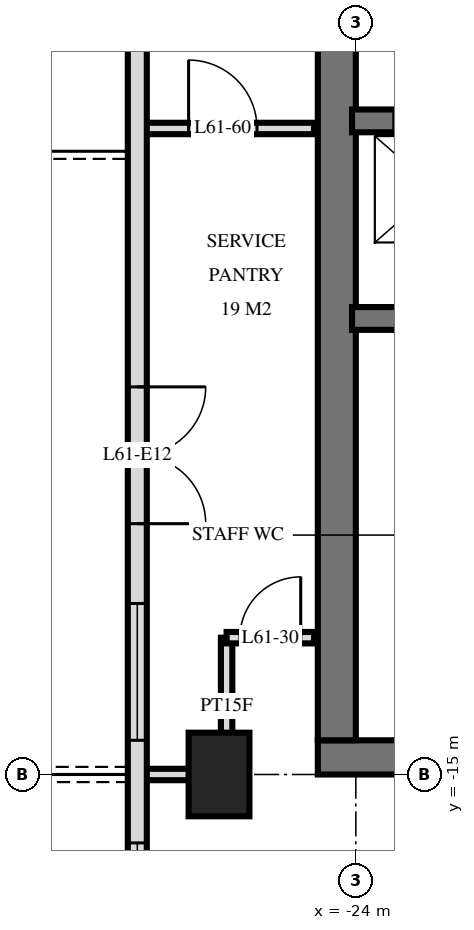
"""IFC4 building model, lengths in metres.
Left out: names, types, materials, properties, quantities, classifications, styles, units other than length and angle.
Written with IfcOpenShell. Run it as: python <this file> out.ifc"""

import sys

from ifc_helpers import new_model, si_unit, direction, frame, frame_2d, origin, origin_2d, place, context, subcontext, project, spatial, rectangle, extrude, element, fill, save


model = new_model("IFC4")
c1 = context("Model", 3, precision=1e-05, world=origin(), true_north=direction((0.0, 1.0)))
c2 = subcontext(c1, "Body", "Model", "MODEL_VIEW")
j1 = project(units=[si_unit("LENGTHUNIT", "METRE"), si_unit("PLANEANGLEUNIT", "RADIAN")], contexts=[c1])
p1 = place(None, origin())
s1 = spatial("IfcSite", under=j1, at=p1, CompositionType="ELEMENT")
p2 = place(p1, origin())
s2 = spatial("IfcBuilding", under=s1, at=p2, CompositionType="ELEMENT")
p3 = place(p2, frame((0.0, 0.0, 232.6)))
s3 = spatial("IfcBuildingStorey", under=s2, at=p3, CompositionType="ELEMENT", Elevation=232.6)
p4 = place(p3, frame((-25.8, -15.0, 0.0), z_axis=(0.0, 0.0, 1.0), x_axis=(0.0, 1.0, 0.0)))
e1 = element("IfcColumn", 1, at=p4, inside=s3, PredefinedType="COLUMN", context=c2, shape_type="SweptSolid", body=[
    extrude(rectangle(XDim=1.1, YDim=0.8, at=origin_2d()), origin(), (0.0, 0.0, 1.0), 3.5),
])
p5 = place(p3, frame((-24.5, -14.775, 0.0), z_axis=(0.0, 0.0, 1.0), x_axis=(1.0, 0.0, 0.0)))
e2 = element("IfcWall", 2, at=p5, inside=s3, PredefinedType="SHEAR", context=c2, shape_type="SweptSolid", body=[
    extrude(rectangle(XDim=14.5, YDim=0.45, at=frame_2d((7.25, 0.0))), origin(), (0.0, 0.0, 1.0), 3.5),
])
p6 = place(p5, frame((6.2, 0.0, 0.0)))
e3 = element("IfcOpeningElement", 3, at=p6, cuts=e2, PredefinedType="OPENING", context=c2, shape_type="SweptSolid", body=[
    extrude(rectangle(XDim=1.2, YDim=2.1, at=frame_2d((0.6, 1.05))), frame((0.0, 0.235, 0.0), z_axis=(0.0, -1.0, 0.0), x_axis=(1.0, 0.0, 0.0)), (0.0, 0.0, 1.0), 0.47),
])
p7 = place(p5, frame((9.25, 0.0, 0.0)))
e4 = element("IfcOpeningElement", 4, at=p7, cuts=e2, PredefinedType="OPENING", context=c2, shape_type="SweptSolid", body=[
    extrude(rectangle(XDim=1.1, YDim=2.1, at=frame_2d((0.55, 1.05))), frame((0.0, 0.235, 0.0), z_axis=(0.0, -1.0, 0.0), x_axis=(1.0, 0.0, 0.0)), (0.0, 0.0, 1.0), 0.47),
])
p8 = place(p5, frame((3.5, 0.0, 0.0)))
e5 = element("IfcOpeningElement", 5, at=p8, cuts=e2, PredefinedType="OPENING", context=c2, shape_type="SweptSolid", body=[
    extrude(rectangle(XDim=0.9, YDim=2.1, at=frame_2d((0.45, 1.05))), frame((0.0, 0.235, 0.0), z_axis=(0.0, -1.0, 0.0), x_axis=(1.0, 0.0, 0.0)), (0.0, 0.0, 1.0), 0.47),
])
p9 = place(p5, frame((1.05, 0.0, 0.0)))
e6 = element("IfcOpeningElement", 6, at=p9, cuts=e2, PredefinedType="OPENING", context=c2, shape_type="SweptSolid", body=[
    extrude(rectangle(XDim=1.0, YDim=2.1, at=frame_2d((0.5, 1.05))), frame((0.0, 0.235, 0.0), z_axis=(0.0, -1.0, 0.0), x_axis=(1.0, 0.0, 0.0)), (0.0, 0.0, 1.0), 0.47),
])
p10 = place(p3, frame((-24.25, -14.55, 0.0), z_axis=(0.0, 0.0, 1.0), x_axis=(0.0, 1.0, 0.0)))
e7 = element("IfcWall", 7, at=p10, inside=s3, PredefinedType="SHEAR", context=c2, shape_type="SweptSolid", body=[
    extrude(rectangle(XDim=14.1, YDim=0.5, at=frame_2d((7.05, 0.0))), origin(), (0.0, 0.0, 1.0), 3.5),
])
p11 = place(p3, frame((-24.05, -6.4, 0.0), z_axis=(0.0, 0.0, 1.0), x_axis=(1.0, 0.0, 0.0)))
e8 = element("IfcWall", 8, at=p11, inside=s3, PredefinedType="SHEAR", context=c2, shape_type="SweptSolid", body=[
    extrude(rectangle(XDim=13.7, YDim=0.3, at=frame_2d((6.85, 0.0))), origin(), (0.0, 0.0, 1.0), 3.5),
])
p12 = place(p11, frame((0.55, 0.0, 0.0)))
e9 = element("IfcOpeningElement", 9, at=p12, cuts=e8, PredefinedType="OPENING", context=c2, shape_type="SweptSolid", body=[
    extrude(rectangle(XDim=1.1, YDim=2.1, at=frame_2d((0.55, 1.05))), frame((0.0, 0.16, 0.0), z_axis=(0.0, -1.0, 0.0), x_axis=(1.0, 0.0, 0.0)), (0.0, 0.0, 1.0), 0.32),
])
p13 = place(p11, frame((5.8, 0.0, 0.0)))
e10 = element("IfcOpeningElement", 10, at=p13, cuts=e8, PredefinedType="OPENING", context=c2, shape_type="SweptSolid", body=[
    extrude(rectangle(XDim=1.1, YDim=2.1, at=frame_2d((0.55, 1.05))), frame((0.0, 0.16, 0.0), z_axis=(0.0, -1.0, 0.0), x_axis=(1.0, 0.0, 0.0)), (0.0, 0.0, 1.0), 0.32),
])
p14 = place(p3, frame((-24.05, -9.0, 0.0), z_axis=(0.0, 0.0, 1.0), x_axis=(1.0, 0.0, 0.0)))
e11 = element("IfcWall", 11, at=p14, inside=s3, PredefinedType="SHEAR", context=c2, shape_type="SweptSolid", body=[
    extrude(rectangle(XDim=13.7, YDim=0.3, at=frame_2d((6.85, 0.0))), origin(), (0.0, 0.0, 1.0), 3.5),
])
p15 = place(p14, frame((8.8, 0.0, 0.0)))
e12 = element("IfcOpeningElement", 12, at=p15, cuts=e11, PredefinedType="OPENING", context=c2, shape_type="SweptSolid", body=[
    extrude(rectangle(XDim=1.1, YDim=2.1, at=frame_2d((0.55, 1.05))), frame((0.0, 0.16, 0.0), z_axis=(0.0, -1.0, 0.0), x_axis=(1.0, 0.0, 0.0)), (0.0, 0.0, 1.0), 0.32),
])
p16 = place(p3, frame((-26.875, -3.325, 0.0), z_axis=(0.0, 0.0, 1.0), x_axis=(0.0, -1.0, 0.0)))
e13 = element("IfcWall", 13, at=p16, inside=s3, PredefinedType="SOLIDWALL", context=c2, shape_type="SweptSolid", body=[
    extrude(rectangle(XDim=21.551, YDim=0.25, at=frame_2d((10.775, 0.0))), origin(), (0.0, 0.0, 1.0), 3.22),
])
p17 = place(p16, frame((6.575, 0.0, 0.0)))
e14 = element("IfcOpeningElement", 14, at=p17, cuts=e13, PredefinedType="OPENING", context=c2, shape_type="SweptSolid", body=[
    extrude(rectangle(XDim=1.8, YDim=2.4, at=frame_2d((0.9, 1.2))), frame((0.0, 0.135, 0.0), z_axis=(0.0, -1.0, 0.0), x_axis=(1.0, 0.0, 0.0)), (0.0, 0.0, 1.0), 0.27),
])
p18 = place(p16, frame((9.425, 0.0, 0.9)))
e15 = element("IfcOpeningElement", 15, at=p18, cuts=e13, PredefinedType="OPENING", context=c2, shape_type="SweptSolid", body=[
    extrude(rectangle(XDim=1.8, YDim=1.5, at=frame_2d((0.9, 0.75))), frame((0.0, 0.135, 0.0), z_axis=(0.0, -1.0, 0.0), x_axis=(1.0, 0.0, 0.0)), (0.0, 0.0, 1.0), 0.27),
])
p19 = place(p16, frame((12.575, 0.0, 0.9)))
e16 = element("IfcOpeningElement", 16, at=p19, cuts=e13, PredefinedType="OPENING", context=c2, shape_type="SweptSolid", body=[
    extrude(rectangle(XDim=1.2, YDim=1.5, at=frame_2d((0.6, 0.75))), frame((0.0, 0.135, 0.0), z_axis=(0.0, -1.0, 0.0), x_axis=(1.0, 0.0, 0.0)), (0.0, 0.0, 1.0), 0.27),
])
p20 = place(p16, frame((15.275, 0.0, 0.0)))
e17 = element("IfcOpeningElement", 17, at=p20, cuts=e13, PredefinedType="OPENING", context=c2, shape_type="SweptSolid", body=[
    extrude(rectangle(XDim=1.8, YDim=2.4, at=frame_2d((0.9, 1.2))), frame((0.0, 0.135, 0.0), z_axis=(0.0, -1.0, 0.0), x_axis=(1.0, 0.0, 0.0)), (0.0, 0.0, 1.0), 0.27),
])
p21 = place(p16, frame((18.875, 0.0, 0.0)))
e18 = element("IfcOpeningElement", 18, at=p21, cuts=e13, PredefinedType="OPENING", context=c2, shape_type="SweptSolid", body=[
    extrude(rectangle(XDim=1.8, YDim=2.4, at=frame_2d((0.9, 1.2))), frame((0.0, 0.135, 0.0), z_axis=(0.0, -1.0, 0.0), x_axis=(1.0, 0.0, 0.0)), (0.0, 0.0, 1.0), 0.27),
])
p22 = place(p3, frame((-25.7, -15.0, 0.0), z_axis=(0.0, 0.0, 1.0), x_axis=(0.0, 1.0, 0.0)))
e19 = element("IfcWall", 19, at=p22, inside=s3, PredefinedType="PARTITIONING", context=c2, shape_type="SweptSolid", body=[
    extrude(rectangle(XDim=1.8, YDim=0.15, at=frame_2d((0.9, 0.0))), origin(), (0.0, 0.0, 1.0), 3.22),
])
p23 = place(p3, frame((-26.82, -15.0, 0.0), z_axis=(0.0, 0.0, 1.0), x_axis=(1.0, 0.0, 0.0)))
e20 = element("IfcWall", 20, at=p23, inside=s3, PredefinedType="PARTITIONING", context=c2, shape_type="SweptSolid", body=[
    extrude(rectangle(XDim=1.12, YDim=0.15, at=frame_2d((0.56, 0.0))), origin(), (0.0, 0.0, 1.0), 3.22),
])
p24 = place(p3, frame((-25.7, -13.2, 0.0), z_axis=(0.0, 0.0, 1.0), x_axis=(1.0, 0.0, 0.0)))
e21 = element("IfcWall", 21, at=p24, inside=s3, PredefinedType="PARTITIONING", context=c2, shape_type="SweptSolid", body=[
    extrude(rectangle(XDim=1.15, YDim=0.15, at=frame_2d((0.575, 0.0))), origin(), (0.0, 0.0, 1.0), 3.22),
])
p25 = place(p24, frame((0.175, 0.0, 0.0)))
e22 = element("IfcOpeningElement", 22, at=p25, cuts=e21, PredefinedType="OPENING", context=c2, shape_type="SweptSolid", body=[
    extrude(rectangle(XDim=0.8, YDim=2.1, at=frame_2d((0.4, 1.05))), frame((0.0, 0.085, 0.0), z_axis=(0.0, -1.0, 0.0), x_axis=(1.0, 0.0, 0.0)), (0.0, 0.0, 1.0), 0.17),
])
p26 = place(p3, frame((-26.82, -6.5, 0.0), z_axis=(0.0, 0.0, 1.0), x_axis=(1.0, 0.0, 0.0)))
e23 = element("IfcWall", 23, at=p26, inside=s3, PredefinedType="PARTITIONING", context=c2, shape_type="SweptSolid", body=[
    extrude(rectangle(XDim=2.27, YDim=0.15, at=frame_2d((1.135, 0.0))), origin(), (0.0, 0.0, 1.0), 3.22),
])
p27 = place(p26, frame((0.62, 0.0, 0.0)))
e24 = element("IfcOpeningElement", 24, at=p27, cuts=e23, PredefinedType="OPENING", context=c2, shape_type="SweptSolid", body=[
    extrude(rectangle(XDim=0.9, YDim=2.1, at=frame_2d((0.45, 1.05))), frame((0.0, 0.085, 0.0), z_axis=(0.0, -1.0, 0.0), x_axis=(1.0, 0.0, 0.0)), (0.0, 0.0, 1.0), 0.17),
])
p28 = place(p17, origin())
e25 = element("IfcDoor", 25, at=p28, inside=s3, OperationType="DOUBLE_DOOR_SINGLE_SWING", PredefinedType="DOOR", context=c2, shape_type="SweptSolid", body=[
    extrude(rectangle(XDim=1.8, YDim=2.4, at=frame_2d((0.9, 1.2))), frame((0.0, 0.025, 0.0), z_axis=(0.0, -1.0, 0.0), x_axis=(1.0, 0.0, 0.0)), (0.0, 0.0, 1.0), 0.05),
])
fill(e14, e25)
p29 = place(p18, origin())
e26 = element("IfcWindow", 26, at=p29, inside=s3, PartitioningType="SINGLE_PANEL", PredefinedType="WINDOW", context=c2, shape_type="SweptSolid", body=[
    extrude(rectangle(XDim=1.8, YDim=1.5, at=frame_2d((0.9, 0.75))), frame((0.0, 0.03, 0.0), z_axis=(0.0, -1.0, 0.0), x_axis=(1.0, 0.0, 0.0)), (0.0, 0.0, 1.0), 0.06),
])
fill(e15, e26)
p30 = place(p19, origin())
e27 = element("IfcWindow", 27, at=p30, inside=s3, PartitioningType="SINGLE_PANEL", PredefinedType="WINDOW", context=c2, shape_type="SweptSolid", body=[
    extrude(rectangle(XDim=1.2, YDim=1.5, at=frame_2d((0.6, 0.75))), frame((0.0, 0.03, 0.0), z_axis=(0.0, -1.0, 0.0), x_axis=(1.0, 0.0, 0.0)), (0.0, 0.0, 1.0), 0.06),
])
fill(e16, e27)
p31 = place(p25, origin())
e28 = element("IfcDoor", 28, at=p31, inside=s3, OperationType="SINGLE_SWING_LEFT", PredefinedType="DOOR", context=c2, shape_type="SweptSolid", body=[
    extrude(rectangle(XDim=0.8, YDim=2.1, at=frame_2d((0.4, 1.05))), frame((0.0, 0.025, 0.0), z_axis=(0.0, -1.0, 0.0), x_axis=(1.0, 0.0, 0.0)), (0.0, 0.0, 1.0), 0.05),
])
fill(e22, e28)
p32 = place(p27, origin())
e29 = element("IfcDoor", 29, at=p32, inside=s3, OperationType="SINGLE_SWING_RIGHT", PredefinedType="DOOR", context=c2, shape_type="SweptSolid", body=[
    extrude(rectangle(XDim=0.9, YDim=2.1, at=frame_2d((0.45, 1.05))), frame((0.0, 0.025, 0.0), z_axis=(0.0, -1.0, 0.0), x_axis=(1.0, 0.0, 0.0)), (0.0, 0.0, 1.0), 0.05),
])
fill(e24, e29)
save(model, sys.argv[1])
